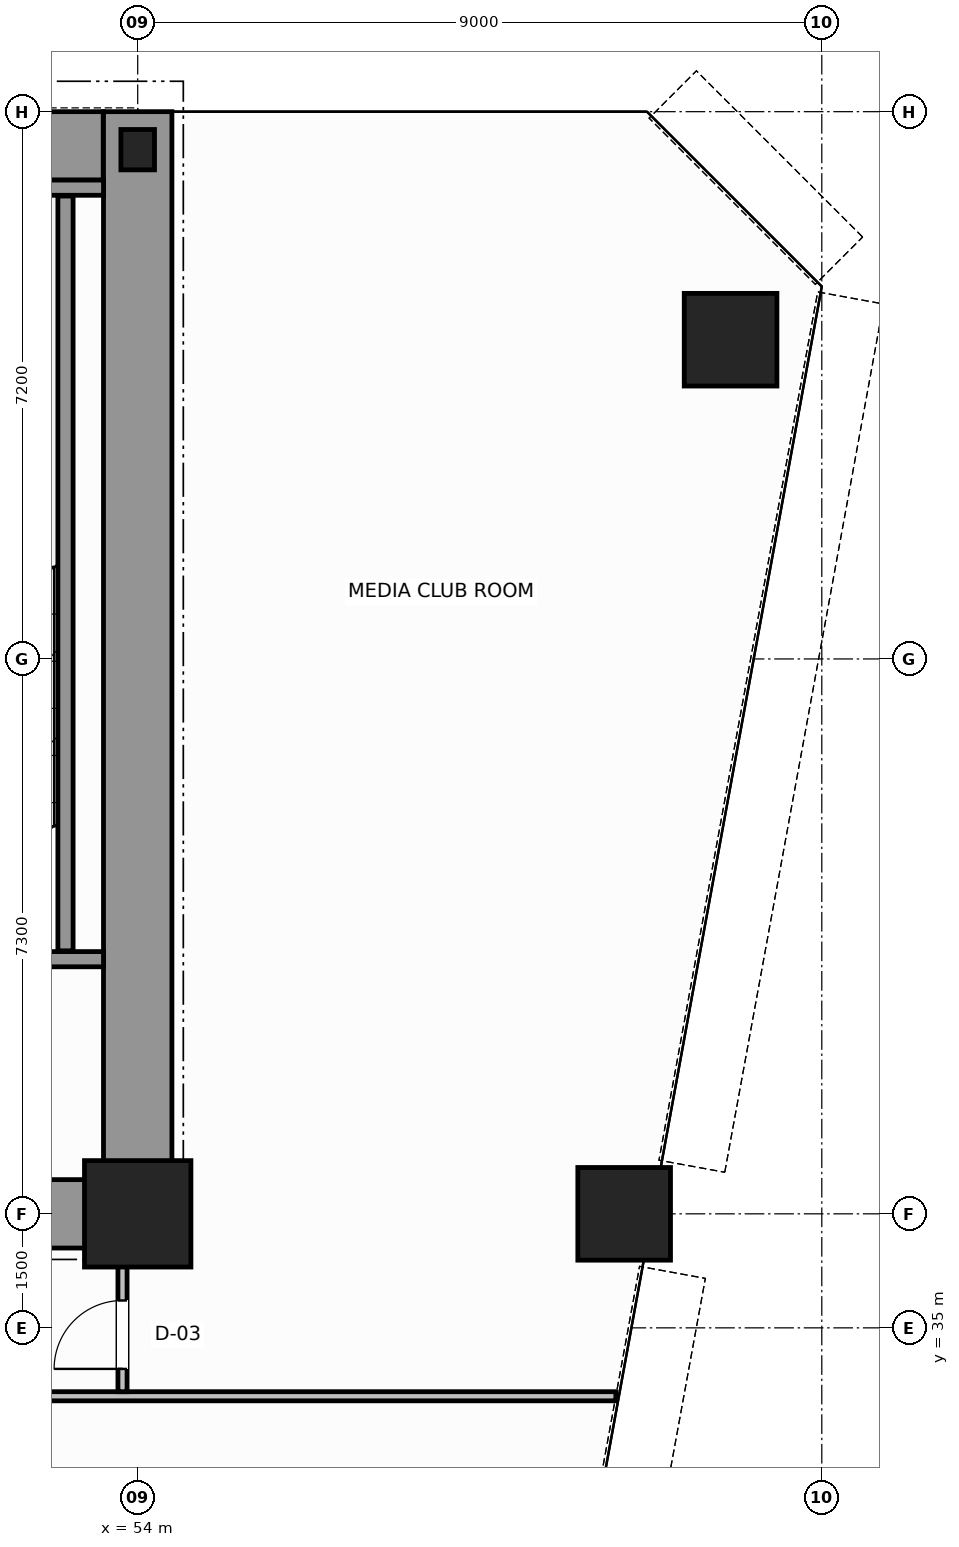
"""IFC4 building model, lengths in metres.
Left out: names, types, materials, properties, quantities, classifications, styles, units other than length and angle.
Written with IfcOpenShell. Run it as: python <this file> out.ifc"""

import sys

from ifc_helpers import new_model, si_unit, direction, frame, frame_2d, origin, origin_2d, place, context, subcontext, project, spatial, rectangle, hollow_circle, i_section, extrude, source, transform, mapped, element, fill, save


model = new_model("IFC4")
c1 = context("Model", 3, precision=1e-05, world=origin(), true_north=direction((0.0, 1.0)))
c2 = subcontext(c1, "Body", "Model", "MODEL_VIEW")
j1 = project(units=[si_unit("LENGTHUNIT", "METRE"), si_unit("PLANEANGLEUNIT", "RADIAN")], contexts=[c1])
p1 = place(None, origin())
s1 = spatial("IfcSite", under=j1, at=p1, CompositionType="ELEMENT")
p2 = place(p1, origin())
s2 = spatial("IfcBuilding", under=s1, at=p2, CompositionType="ELEMENT")
p3 = place(p2, frame((0.0, 0.0, 79.6)))
s3 = spatial("IfcBuildingStorey", under=s2, at=p3, CompositionType="ELEMENT", Elevation=79.6)
m1 = source(origin(), c2, "Body", "SweptSolid", [
    extrude(rectangle(XDim=1.4, YDim=1.4, at=origin_2d()), origin(), (0.0, 0.0, 1.0), 3.8),
])
p4 = place(p3, frame((54.0, 36.5, 0.0), z_axis=(0.0, 0.0, 1.0), x_axis=(1.0, 0.0, 0.0)))
e1 = element("IfcColumn", 1, at=p4, inside=s3, PredefinedType="COLUMN", context=c2, shape_type="MappedRepresentation", body=[
    mapped(m1, transform((0.0, 0.0, 0.0), scale=1.0)),
])
m2 = source(origin(), c2, "Body", "SweptSolid", [
    extrude(i_section(OverallWidth=0.442, OverallDepth=0.531, WebThickness=0.065, FlangeThickness=0.076, FilletRadius=0.015, at=origin_2d()), origin(), (0.0, 0.0, 1.0), 3.8),
])
p5 = place(p3, frame((54.0, 50.5, 0.0), z_axis=(0.0, 0.0, 1.0), x_axis=(1.0, 0.0, 0.0)))
e2 = element("IfcColumn", 2, at=p5, inside=s3, PredefinedType="COLUMN", context=c2, shape_type="MappedRepresentation", body=[
    mapped(m2, transform((0.0, 0.0, 0.0), scale=1.0)),
])
m3 = source(origin(), c2, "Body", "SweptSolid", [
    extrude(hollow_circle(Radius=0.61, WallThickness=0.05, at=origin_2d()), origin(), (0.0, 0.0, 1.0), 3.8),
])
for number, where, z_axis, x_axis in (
    (3, (61.8, 48.0, 0.0), (0.0, 0.0, 1.0), (1.0, 0.0, 0.0)),
    (4, (60.4, 36.5, 0.0), (0.0, 0.0, 1.0), (1.0, 0.0, 0.0)),
):
    element("IfcColumn", number, at=place(p3, frame(where, z_axis=z_axis, x_axis=x_axis)), inside=s3, PredefinedType="COLUMN", context=c2, shape_type="MappedRepresentation", body=[
        mapped(m3, transform((0.0, 0.0, 0.0), scale=1.0)),
    ])
p6 = place(p3, frame((34.002, 50.55, 0.0), z_axis=(0.0, 0.0, 1.0), x_axis=(1.0, 0.0, 0.0)))
e5 = element("IfcWall", 5, at=p6, inside=s3, PredefinedType="SHEAR", context=c2, shape_type="SweptSolid", body=[
    extrude(rectangle(XDim=19.544, YDim=0.9, at=frame_2d((9.772, 0.0))), origin(), (0.0, 0.0, 1.0), 3.8),
])
p7 = place(p3, frame((54.0, 36.5, 0.0), z_axis=(0.0, 0.0, 1.0), x_axis=(0.0, 1.0, 0.0)))
e6 = element("IfcWall", 6, at=p7, inside=s3, PredefinedType="SHEAR", context=c2, shape_type="SweptSolid", body=[
    extrude(rectangle(XDim=14.5, YDim=0.9, at=frame_2d((7.25, 0.0))), origin(), (0.0, 0.0, 1.0), 3.8),
])
p8 = place(p3, frame((49.8, 36.5, 0.0), z_axis=(0.0, 0.0, 1.0), x_axis=(1.0, 0.0, 0.0)))
e7 = element("IfcWall", 7, at=p8, inside=s3, PredefinedType="SHEAR", context=c2, shape_type="SweptSolid", body=[
    extrude(rectangle(XDim=3.73, YDim=0.9, at=frame_2d((1.865, 0.0))), origin(), (0.0, 0.0, 1.0), 2.34),
])
p9 = place(p3, frame((49.4, 39.85, 0.0), z_axis=(0.0, 0.0, 1.0), x_axis=(1.0, 0.0, 0.0)))
e8 = element("IfcWall", 8, at=p9, inside=s3, PredefinedType="SOLIDWALL", context=c2, shape_type="SweptSolid", body=[
    extrude(rectangle(XDim=4.15, YDim=0.2, at=frame_2d((2.075, 0.0))), origin(), (0.0, 0.0, 1.0), 3.8),
])
p10 = place(p9, frame((1.325, 0.0, 0.0)))
e9 = element("IfcOpeningElement", 9, at=p10, cuts=e8, PredefinedType="OPENING", context=c2, shape_type="SweptSolid", body=[
    extrude(rectangle(XDim=1.1, YDim=2.15, at=frame_2d((0.55, 1.075))), frame((0.0, 0.11, 0.0), z_axis=(0.0, -1.0, 0.0), x_axis=(1.0, 0.0, 0.0)), (0.0, 0.0, 1.0), 0.22),
])
p11 = place(p3, frame((49.4, 50.0, 0.0), z_axis=(0.0, 0.0, 1.0), x_axis=(1.0, 0.0, 0.0)))
e10 = element("IfcWall", 10, at=p11, inside=s3, PredefinedType="SOLIDWALL", context=c2, shape_type="SweptSolid", body=[
    extrude(rectangle(XDim=4.15, YDim=0.2, at=frame_2d((2.075, 0.0))), origin(), (0.0, 0.0, 1.0), 3.8),
])
p12 = place(p3, frame((53.05, 39.96, 0.0), z_axis=(0.0, 0.0, 1.0), x_axis=(0.0, 1.0, 0.0)))
e11 = element("IfcWall", 11, at=p12, inside=s3, PredefinedType="SOLIDWALL", context=c2, shape_type="SweptSolid", body=[
    extrude(rectangle(XDim=9.93, YDim=0.2, at=frame_2d((4.965, 0.0))), origin(), (0.0, 0.0, 1.0), 3.8),
])
p13 = place(p3, frame((50.86, 34.1, 0.0), z_axis=(0.0, 0.0, 1.0), x_axis=(1.0, 0.0, 0.0)))
e12 = element("IfcWall", 12, at=p13, inside=s3, PredefinedType="PARTITIONING", context=c2, shape_type="SweptSolid", body=[
    extrude(rectangle(XDim=9.431, YDim=0.12, at=frame_2d((4.715, 0.0))), origin(), (0.0, 0.0, 1.0), 3.54),
])
p14 = place(p3, frame((53.8, 34.16, 0.0), z_axis=(0.0, 0.0, 1.0), x_axis=(0.0, 1.0, 0.0)))
e13 = element("IfcWall", 13, at=p14, inside=s3, PredefinedType="PARTITIONING", context=c2, shape_type="SweptSolid", body=[
    extrude(rectangle(XDim=2.28, YDim=0.12, at=frame_2d((1.14, 0.0))), origin(), (0.0, 0.0, 1.0), 3.54),
])
p15 = place(p14, frame((0.3, 0.0, 0.0)))
e14 = element("IfcOpeningElement", 14, at=p15, cuts=e13, PredefinedType="OPENING", context=c2, shape_type="SweptSolid", body=[
    extrude(rectangle(XDim=0.9, YDim=2.15, at=frame_2d((0.45, 1.075))), frame((0.0, 0.07, 0.0), z_axis=(0.0, -1.0, 0.0), x_axis=(1.0, 0.0, 0.0)), (0.0, 0.0, 1.0), 0.14),
])
m4 = source(origin(), c2, "Body", "SweptSolid", [
    extrude(rectangle(XDim=0.9, YDim=2.15, at=frame_2d((0.45, 1.075))), frame((0.0, 0.025, 0.0), z_axis=(0.0, -1.0, 0.0), x_axis=(1.0, 0.0, 0.0)), (0.0, 0.0, 1.0), 0.05),
])
p16 = place(p15, origin())
e15 = element("IfcDoor", 15, at=p16, inside=s3, OperationType="SINGLE_SWING_RIGHT", PredefinedType="DOOR", context=c2, shape_type="MappedRepresentation", body=[
    mapped(m4, transform((0.0, 0.0, 0.0), scale=1.0)),
])
fill(e14, e15)
save(model, sys.argv[1])
